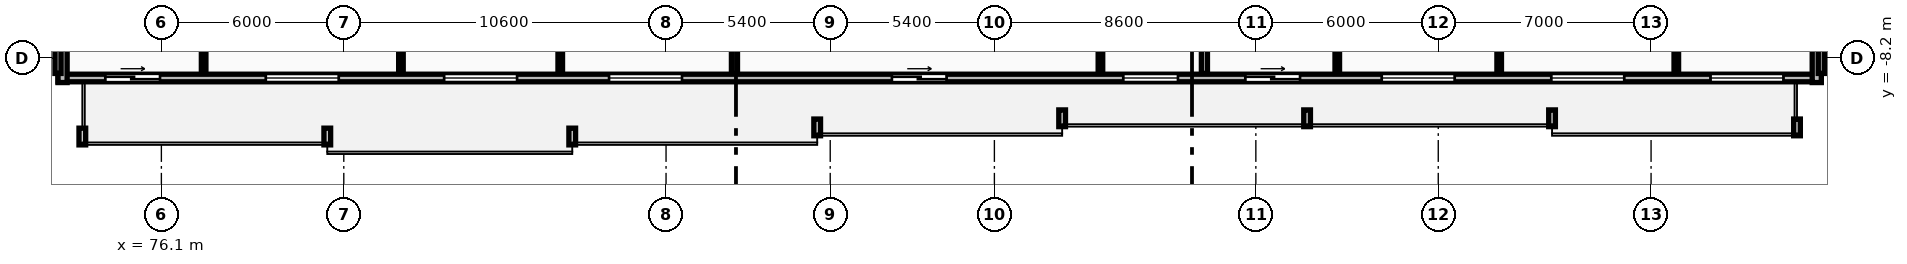
"""IFC4 building model, lengths in metres.
Left out: names, types, materials, properties, quantities, classifications, styles, units other than length and angle.
Written with IfcOpenShell. Run it as: python <this file> out.ifc"""

import sys

from ifc_helpers import new_model, si_unit, direction, frame, frame_2d, origin, place, context, subcontext, project, spatial, rectangle, extrude, element, fill, save


model = new_model("IFC4")
c1 = context("Model", 3, precision=1e-05, world=origin(), true_north=direction((0.0, 1.0)))
c2 = subcontext(c1, "Body", "Model", "MODEL_VIEW")
j1 = project(units=[si_unit("LENGTHUNIT", "METRE"), si_unit("PLANEANGLEUNIT", "RADIAN")], contexts=[c1])
p1 = place(None, origin())
s1 = spatial("IfcSite", under=j1, at=p1, CompositionType="ELEMENT")
p2 = place(p1, origin())
s2 = spatial("IfcBuilding", under=s1, at=p2, CompositionType="ELEMENT")
p3 = place(p2, frame((0.0, 0.0, 146.5)))
s3 = spatial("IfcBuildingStorey", under=s2, at=p3, CompositionType="ELEMENT", Elevation=146.5)
p4 = place(p3, frame((72.7, -8.85, 0.0), z_axis=(0.0, 0.0, 1.0), x_axis=(1.0, 0.0, 0.0)))
e1 = element("IfcWall", 1, at=p4, inside=s3, PredefinedType="STANDARD", context=c2, shape_type="SweptSolid", body=[
    extrude(rectangle(XDim=58.0, YDim=0.25, at=frame_2d((29.0, 0.0))), origin(), (0.0, 0.0, 1.0), 3.31),
])
p5 = place(p4, frame((6.835, 0.0, 0.85)))
e2 = element("IfcOpeningElement", 2, at=p5, cuts=e1, PredefinedType="OPENING", context=c2, shape_type="SweptSolid", body=[
    extrude(rectangle(XDim=2.4, YDim=1.9, at=frame_2d((1.2, 0.95))), frame((0.0, 0.135, 0.0), z_axis=(0.0, -1.0, 0.0), x_axis=(1.0, 0.0, 0.0)), (0.0, 0.0, 1.0), 0.27),
])
p6 = place(p4, frame((12.7, 0.0, 0.85)))
e3 = element("IfcOpeningElement", 3, at=p6, cuts=e1, PredefinedType="OPENING", context=c2, shape_type="SweptSolid", body=[
    extrude(rectangle(XDim=2.4, YDim=1.9, at=frame_2d((1.2, 0.95))), frame((0.0, 0.135, 0.0), z_axis=(0.0, -1.0, 0.0), x_axis=(1.0, 0.0, 0.0)), (0.0, 0.0, 1.0), 0.27),
])
p7 = place(p4, frame((1.555, 0.0, 0.0)))
e4 = element("IfcOpeningElement", 4, at=p7, cuts=e1, PredefinedType="OPENING", context=c2, shape_type="SweptSolid", body=[
    extrude(rectangle(XDim=1.8, YDim=2.2, at=frame_2d((0.9, 1.1))), frame((0.0, 0.135, 0.0), z_axis=(0.0, -1.0, 0.0), x_axis=(1.0, 0.0, 0.0)), (0.0, 0.0, 1.0), 0.27),
])
p8 = place(p4, frame((18.125, 0.0, 0.85)))
e5 = element("IfcOpeningElement", 5, at=p8, cuts=e1, PredefinedType="OPENING", context=c2, shape_type="SweptSolid", body=[
    extrude(rectangle(XDim=2.4, YDim=1.9, at=frame_2d((1.2, 0.95))), frame((0.0, 0.135, 0.0), z_axis=(0.0, -1.0, 0.0), x_axis=(1.0, 0.0, 0.0)), (0.0, 0.0, 1.0), 0.27),
])
p9 = place(p4, frame((27.429, 0.0, 0.0)))
e6 = element("IfcOpeningElement", 6, at=p9, cuts=e1, PredefinedType="OPENING", context=c2, shape_type="SweptSolid", body=[
    extrude(rectangle(XDim=1.8, YDim=2.2, at=frame_2d((0.9, 1.1))), frame((0.0, 0.135, 0.0), z_axis=(0.0, -1.0, 0.0), x_axis=(1.0, 0.0, 0.0)), (0.0, 0.0, 1.0), 0.27),
])
p10 = place(p4, frame((35.038, 0.0, 0.85)))
e7 = element("IfcOpeningElement", 7, at=p10, cuts=e1, PredefinedType="OPENING", context=c2, shape_type="SweptSolid", body=[
    extrude(rectangle(XDim=1.8, YDim=1.8, at=frame_2d((0.9, 0.9))), frame((0.0, 0.135, 0.0), z_axis=(0.0, -1.0, 0.0), x_axis=(1.0, 0.0, 0.0)), (0.0, 0.0, 1.0), 0.27),
])
p11 = place(p4, frame((43.541, 0.0, 0.85)))
e8 = element("IfcOpeningElement", 8, at=p11, cuts=e1, PredefinedType="OPENING", context=c2, shape_type="SweptSolid", body=[
    extrude(rectangle(XDim=2.4, YDim=1.9, at=frame_2d((1.2, 0.95))), frame((0.0, 0.135, 0.0), z_axis=(0.0, -1.0, 0.0), x_axis=(1.0, 0.0, 0.0)), (0.0, 0.0, 1.0), 0.27),
])
p12 = place(p4, frame((49.117, 0.0, 0.85)))
e9 = element("IfcOpeningElement", 9, at=p12, cuts=e1, PredefinedType="OPENING", context=c2, shape_type="SweptSolid", body=[
    extrude(rectangle(XDim=2.4, YDim=1.9, at=frame_2d((1.2, 0.95))), frame((0.0, 0.135, 0.0), z_axis=(0.0, -1.0, 0.0), x_axis=(1.0, 0.0, 0.0)), (0.0, 0.0, 1.0), 0.27),
])
p13 = place(p4, frame((39.053, 0.0, 0.0)))
e10 = element("IfcOpeningElement", 10, at=p13, cuts=e1, PredefinedType="OPENING", context=c2, shape_type="SweptSolid", body=[
    extrude(rectangle(XDim=1.8, YDim=2.2, at=frame_2d((0.9, 1.1))), frame((0.0, 0.135, 0.0), z_axis=(0.0, -1.0, 0.0), x_axis=(1.0, 0.0, 0.0)), (0.0, 0.0, 1.0), 0.27),
])
p14 = place(p4, frame((54.355, 0.0, 0.85)))
e11 = element("IfcOpeningElement", 11, at=p14, cuts=e1, PredefinedType="OPENING", context=c2, shape_type="SweptSolid", body=[
    extrude(rectangle(XDim=2.4, YDim=1.9, at=frame_2d((1.2, 0.95))), frame((0.0, 0.135, 0.0), z_axis=(0.0, -1.0, 0.0), x_axis=(1.0, 0.0, 0.0)), (0.0, 0.0, 1.0), 0.27),
])
for number, where, z_axis, x_axis in (
    (12, (130.55, -9.0, 0.0), (0.0, 0.0, 1.0), (0.0, 1.0, 0.0)),
    (13, (72.85, -5.4, 0.0), (0.0, 0.0, 1.0), (0.0, -1.0, 0.0)),
):
    element("IfcWall", number, at=place(p3, frame(where, z_axis=z_axis, x_axis=x_axis)), inside=s3, PredefinedType="STANDARD", context=c2, shape_type="SweptSolid", body=[
        extrude(rectangle(XDim=3.6, YDim=0.3, at=frame_2d((1.8, 0.0))), origin(), (0.0, 0.0, 1.0), 3.31),
    ])
for number, where, z_axis, x_axis in (
    (14, (72.7, -8.7, 0.0), (0.0, 0.0, 1.0), (0.0, 1.0, 0.0)),
    (15, (130.7, -8.7, 0.0), (0.0, 0.0, 1.0), (0.0, 1.0, 0.0)),
    (16, (94.95, -8.7, 0.0), (0.0, 0.0, 1.0), (0.0, 1.0, 0.0)),
):
    element("IfcWall", number, at=place(p3, frame(where, z_axis=z_axis, x_axis=x_axis)), inside=s3, PredefinedType="PARTITIONING", context=c2, shape_type="SweptSolid", body=[
        extrude(rectangle(XDim=24.57, YDim=0.2, at=frame_2d((12.285, 0.0))), origin(), (0.0, 0.0, 1.0), 3.31),
    ])
p15 = place(p3, frame((83.98, -8.7, 0.0), z_axis=(0.0, 0.0, 1.0), x_axis=(0.0, 1.0, 0.0)))
e17 = element("IfcWall", 17, at=p15, inside=s3, PredefinedType="PARTITIONING", context=c2, shape_type="SweptSolid", body=[
    extrude(rectangle(XDim=4.82, YDim=0.15, at=frame_2d((2.41, 0.0))), origin(), (0.0, 0.0, 1.0), 3.31),
])
p16 = place(p3, frame((77.49, -8.7, 0.0), z_axis=(0.0, 0.0, 1.0), x_axis=(0.0, 1.0, 0.0)))
e18 = element("IfcWall", 18, at=p16, inside=s3, PredefinedType="PARTITIONING", context=c2, shape_type="SweptSolid", body=[
    extrude(rectangle(XDim=9.96, YDim=0.15, at=frame_2d((4.98, 0.0))), origin(), (0.0, 0.0, 1.0), 3.31),
])
p17 = place(p16, frame((5.22, 0.0, 0.0)))
e19 = element("IfcOpeningElement", 19, at=p17, cuts=e18, PredefinedType="OPENING", context=c2, shape_type="SweptSolid", body=[
    extrude(rectangle(XDim=0.92, YDim=2.08, at=frame_2d((0.46, 1.04))), frame((0.0, 0.085, 0.0), z_axis=(0.0, -1.0, 0.0), x_axis=(1.0, 0.0, 0.0)), (0.0, 0.0, 1.0), 0.17),
])
p18 = place(p3, frame((89.22, -8.7, 0.0), z_axis=(0.0, 0.0, 1.0), x_axis=(0.0, 1.0, 0.0)))
e20 = element("IfcWall", 20, at=p18, inside=s3, PredefinedType="PARTITIONING", context=c2, shape_type="SweptSolid", body=[
    extrude(rectangle(XDim=7.34, YDim=0.15, at=frame_2d((3.67, 0.0))), origin(), (0.0, 0.0, 1.0), 3.31),
])
p19 = place(p18, frame((5.897, 0.0, 0.0)))
e21 = element("IfcOpeningElement", 21, at=p19, cuts=e20, PredefinedType="OPENING", context=c2, shape_type="SweptSolid", body=[
    extrude(rectangle(XDim=0.92, YDim=2.08, at=frame_2d((0.46, 1.04))), frame((0.0, 0.085, 0.0), z_axis=(0.0, -1.0, 0.0), x_axis=(1.0, 0.0, 0.0)), (0.0, 0.0, 1.0), 0.17),
])
p20 = place(p3, frame((110.408, -8.7, 0.0), z_axis=(0.0, 0.0, 1.0), x_axis=(0.0, 1.0, 0.0)))
e22 = element("IfcWall", 22, at=p20, inside=s3, PredefinedType="PARTITIONING", context=c2, shape_type="SweptSolid", body=[
    extrude(rectangle(XDim=24.57, YDim=0.2, at=frame_2d((12.285, 0.0))), origin(), (0.0, 0.0, 1.0), 3.31),
])
p21 = place(p3, frame((106.988, -8.7, 0.0), z_axis=(0.0, 0.0, 1.0), x_axis=(0.0, 1.0, 0.0)))
e23 = element("IfcWall", 23, at=p21, inside=s3, PredefinedType="PARTITIONING", context=c2, shape_type="SweptSolid", body=[
    extrude(rectangle(XDim=9.96, YDim=0.15, at=frame_2d((4.98, 0.0))), origin(), (0.0, 0.0, 1.0), 3.31),
])
p22 = place(p21, frame((5.894, 0.0, 0.0)))
e24 = element("IfcOpeningElement", 24, at=p22, cuts=e23, PredefinedType="OPENING", context=c2, shape_type="SweptSolid", body=[
    extrude(rectangle(XDim=0.84, YDim=2.04, at=frame_2d((0.42, 1.02))), frame((0.0, 0.085, 0.0), z_axis=(0.0, -1.0, 0.0), x_axis=(1.0, 0.0, 0.0)), (0.0, 0.0, 1.0), 0.17),
])
p23 = place(p21, frame((7.69, 0.0, 0.0)))
e25 = element("IfcOpeningElement", 25, at=p23, cuts=e23, PredefinedType="OPENING", context=c2, shape_type="SweptSolid", body=[
    extrude(rectangle(XDim=0.84, YDim=2.04, at=frame_2d((0.42, 1.02))), frame((0.0, 0.085, 0.0), z_axis=(0.0, -1.0, 0.0), x_axis=(1.0, 0.0, 0.0)), (0.0, 0.0, 1.0), 0.17),
])
p24 = place(p21, frame((2.223, 0.0, 0.0)))
e26 = element("IfcOpeningElement", 26, at=p24, cuts=e23, PredefinedType="OPENING", context=c2, shape_type="SweptSolid", body=[
    extrude(rectangle(XDim=0.88, YDim=2.06, at=frame_2d((0.44, 1.03))), frame((0.0, 0.085, 0.0), z_axis=(0.0, -1.0, 0.0), x_axis=(1.0, 0.0, 0.0)), (0.0, 0.0, 1.0), 0.17),
])
p25 = place(p3, frame((120.104, -8.7, 0.0), z_axis=(0.0, 0.0, 1.0), x_axis=(0.0, 1.0, 0.0)))
e27 = element("IfcWall", 27, at=p25, inside=s3, PredefinedType="PARTITIONING", context=c2, shape_type="SweptSolid", body=[
    extrude(rectangle(XDim=4.82, YDim=0.15, at=frame_2d((2.41, 0.0))), origin(), (0.0, 0.0, 1.0), 3.31),
])
p26 = place(p3, frame((114.778, -8.7, 0.0), z_axis=(0.0, 0.0, 1.0), x_axis=(0.0, 1.0, 0.0)))
e28 = element("IfcWall", 28, at=p26, inside=s3, PredefinedType="PARTITIONING", context=c2, shape_type="SweptSolid", body=[
    extrude(rectangle(XDim=9.96, YDim=0.15, at=frame_2d((4.98, 0.0))), origin(), (0.0, 0.0, 1.0), 3.31),
])
p27 = place(p26, frame((5.22, 0.0, 0.0)))
e29 = element("IfcOpeningElement", 29, at=p27, cuts=e28, PredefinedType="OPENING", context=c2, shape_type="SweptSolid", body=[
    extrude(rectangle(XDim=0.92, YDim=2.08, at=frame_2d((0.46, 1.04))), frame((0.0, 0.085, 0.0), z_axis=(0.0, -1.0, 0.0), x_axis=(1.0, 0.0, 0.0)), (0.0, 0.0, 1.0), 0.17),
])
p28 = place(p3, frame((125.93, -8.7, 0.0), z_axis=(0.0, 0.0, 1.0), x_axis=(0.0, 1.0, 0.0)))
e30 = element("IfcWall", 30, at=p28, inside=s3, PredefinedType="PARTITIONING", context=c2, shape_type="SweptSolid", body=[
    extrude(rectangle(XDim=7.23, YDim=0.15, at=frame_2d((3.615, 0.0))), origin(), (0.0, 0.0, 1.0), 3.31),
])
p29 = place(p28, frame((5.884, 0.0, 0.0)))
e31 = element("IfcOpeningElement", 31, at=p29, cuts=e30, PredefinedType="OPENING", context=c2, shape_type="SweptSolid", body=[
    extrude(rectangle(XDim=0.92, YDim=2.08, at=frame_2d((0.46, 1.04))), frame((0.0, 0.085, 0.0), z_axis=(0.0, -1.0, 0.0), x_axis=(1.0, 0.0, 0.0)), (0.0, 0.0, 1.0), 0.17),
])
p30 = place(p5, origin())
e32 = element("IfcWindow", 32, at=p30, inside=s3, PartitioningType="DOUBLE_PANEL_VERTICAL", PredefinedType="WINDOW", context=c2, shape_type="SweptSolid", body=[
    extrude(rectangle(XDim=2.4, YDim=1.9, at=frame_2d((1.2, 0.95))), frame((0.0, 0.03, 0.0), z_axis=(0.0, -1.0, 0.0), x_axis=(1.0, 0.0, 0.0)), (0.0, 0.0, 1.0), 0.06),
])
fill(e2, e32)
p31 = place(p6, origin())
e33 = element("IfcWindow", 33, at=p31, inside=s3, PartitioningType="DOUBLE_PANEL_VERTICAL", PredefinedType="WINDOW", context=c2, shape_type="SweptSolid", body=[
    extrude(rectangle(XDim=2.4, YDim=1.9, at=frame_2d((1.2, 0.95))), frame((0.0, 0.03, 0.0), z_axis=(0.0, -1.0, 0.0), x_axis=(1.0, 0.0, 0.0)), (0.0, 0.0, 1.0), 0.06),
])
fill(e3, e33)
p32 = place(p7, origin())
e34 = element("IfcDoor", 34, at=p32, inside=s3, OperationType="SLIDING_TO_RIGHT", PredefinedType="DOOR", context=c2, shape_type="SweptSolid", body=[
    extrude(rectangle(XDim=1.8, YDim=2.2, at=frame_2d((0.9, 1.1))), frame((0.0, 0.025, 0.0), z_axis=(0.0, -1.0, 0.0), x_axis=(1.0, 0.0, 0.0)), (0.0, 0.0, 1.0), 0.05),
])
fill(e4, e34)
p33 = place(p8, origin())
e35 = element("IfcWindow", 35, at=p33, inside=s3, PartitioningType="DOUBLE_PANEL_VERTICAL", PredefinedType="WINDOW", context=c2, shape_type="SweptSolid", body=[
    extrude(rectangle(XDim=2.4, YDim=1.9, at=frame_2d((1.2, 0.95))), frame((0.0, 0.03, 0.0), z_axis=(0.0, -1.0, 0.0), x_axis=(1.0, 0.0, 0.0)), (0.0, 0.0, 1.0), 0.06),
])
fill(e5, e35)
p34 = place(p9, origin())
e36 = element("IfcDoor", 36, at=p34, inside=s3, OperationType="SLIDING_TO_RIGHT", PredefinedType="DOOR", context=c2, shape_type="SweptSolid", body=[
    extrude(rectangle(XDim=1.8, YDim=2.2, at=frame_2d((0.9, 1.1))), frame((0.0, 0.025, 0.0), z_axis=(0.0, -1.0, 0.0), x_axis=(1.0, 0.0, 0.0)), (0.0, 0.0, 1.0), 0.05),
])
fill(e6, e36)
p35 = place(p10, origin())
e37 = element("IfcWindow", 37, at=p35, inside=s3, PartitioningType="SINGLE_PANEL", PredefinedType="WINDOW", context=c2, shape_type="SweptSolid", body=[
    extrude(rectangle(XDim=1.8, YDim=1.8, at=frame_2d((0.9, 0.9))), frame((0.0, 0.03, 0.0), z_axis=(0.0, -1.0, 0.0), x_axis=(1.0, 0.0, 0.0)), (0.0, 0.0, 1.0), 0.06),
])
fill(e7, e37)
p36 = place(p11, origin())
e38 = element("IfcWindow", 38, at=p36, inside=s3, PartitioningType="DOUBLE_PANEL_VERTICAL", PredefinedType="WINDOW", context=c2, shape_type="SweptSolid", body=[
    extrude(rectangle(XDim=2.4, YDim=1.9, at=frame_2d((1.2, 0.95))), frame((0.0, 0.03, 0.0), z_axis=(0.0, -1.0, 0.0), x_axis=(1.0, 0.0, 0.0)), (0.0, 0.0, 1.0), 0.06),
])
fill(e8, e38)
p37 = place(p12, origin())
e39 = element("IfcWindow", 39, at=p37, inside=s3, PartitioningType="DOUBLE_PANEL_VERTICAL", PredefinedType="WINDOW", context=c2, shape_type="SweptSolid", body=[
    extrude(rectangle(XDim=2.4, YDim=1.9, at=frame_2d((1.2, 0.95))), frame((0.0, 0.03, 0.0), z_axis=(0.0, -1.0, 0.0), x_axis=(1.0, 0.0, 0.0)), (0.0, 0.0, 1.0), 0.06),
])
fill(e9, e39)
p38 = place(p13, origin())
e40 = element("IfcDoor", 40, at=p38, inside=s3, OperationType="SLIDING_TO_RIGHT", PredefinedType="DOOR", context=c2, shape_type="SweptSolid", body=[
    extrude(rectangle(XDim=1.8, YDim=2.2, at=frame_2d((0.9, 1.1))), frame((0.0, 0.025, 0.0), z_axis=(0.0, -1.0, 0.0), x_axis=(1.0, 0.0, 0.0)), (0.0, 0.0, 1.0), 0.05),
])
fill(e10, e40)
p39 = place(p14, origin())
e41 = element("IfcWindow", 41, at=p39, inside=s3, PartitioningType="DOUBLE_PANEL_VERTICAL", PredefinedType="WINDOW", context=c2, shape_type="SweptSolid", body=[
    extrude(rectangle(XDim=2.4, YDim=1.9, at=frame_2d((1.2, 0.95))), frame((0.0, 0.03, 0.0), z_axis=(0.0, -1.0, 0.0), x_axis=(1.0, 0.0, 0.0)), (0.0, 0.0, 1.0), 0.06),
])
fill(e11, e41)
save(model, sys.argv[1])
